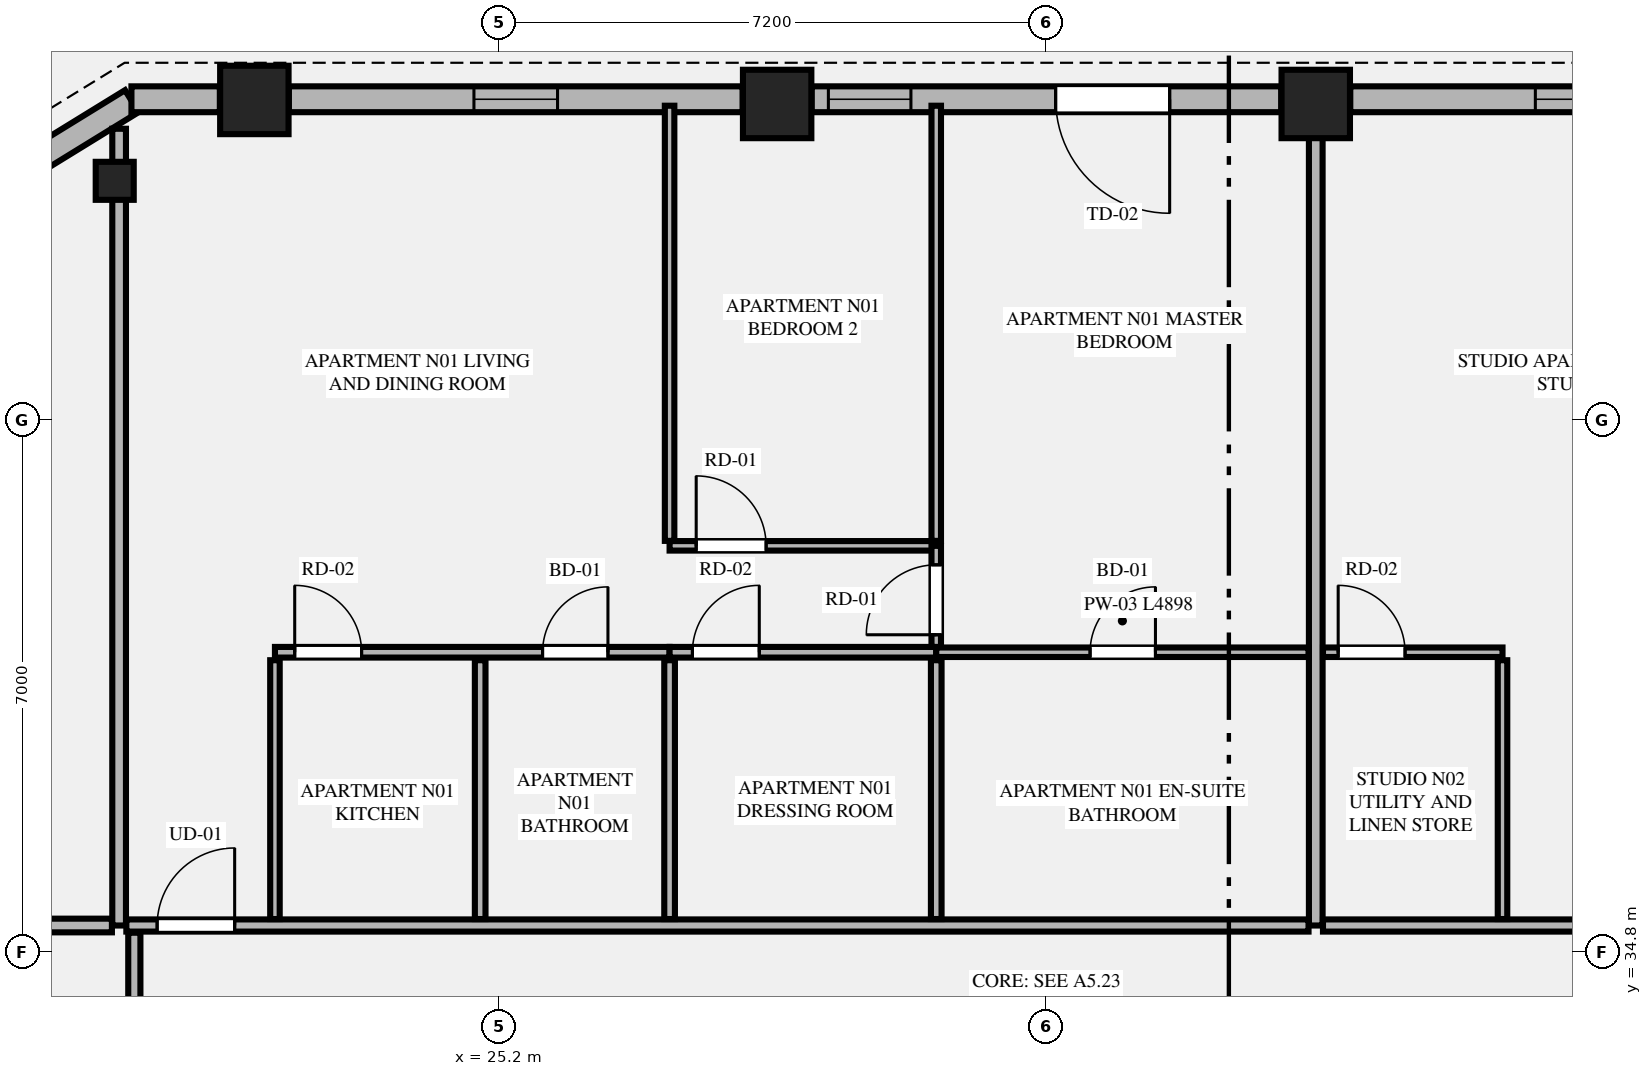
"""IFC4 building model, lengths in metres.
Left out: names, types, materials, properties, quantities, classifications, styles, units other than length and angle.
Written with IfcOpenShell. Run it as: python <this file> out.ifc"""

import sys

from ifc_helpers import new_model, si_unit, direction, frame, frame_2d, origin, origin_2d, place, context, subcontext, project, spatial, rectangle, extrude, element, fill, save


model = new_model("IFC4")
c1 = context("Model", 3, precision=1e-05, world=origin(), true_north=direction((0.0, 1.0)))
c2 = subcontext(c1, "Body", "Model", "MODEL_VIEW")
j1 = project(units=[si_unit("LENGTHUNIT", "METRE"), si_unit("PLANEANGLEUNIT", "RADIAN")], contexts=[c1])
p1 = place(None, origin())
s1 = spatial("IfcSite", under=j1, at=p1, CompositionType="ELEMENT")
p2 = place(p1, origin())
s2 = spatial("IfcBuilding", under=s1, at=p2, CompositionType="ELEMENT")
p3 = place(p2, frame((0.0, 0.0, 171.9)))
s3 = spatial("IfcBuildingStorey", under=s2, at=p3, CompositionType="ELEMENT", Elevation=171.9)
for number, where, z_axis, x_axis in (
    (1, (35.943, 45.958, 0.0), (0.0, 0.0, 1.0), (1.0, 0.0, 0.0)),
    (2, (28.857, 45.958, 0.0), (0.0, 0.0, 1.0), (1.0, 0.0, 0.0)),
    (3, (21.979, 46.011, 0.0), (0.0, 0.0, 1.0), (1.0, 0.0, 0.0)),
):
    element("IfcColumn", number, at=place(p3, frame(where, z_axis=z_axis, x_axis=x_axis)), inside=s3, PredefinedType="COLUMN", context=c2, shape_type="SweptSolid", body=[
        extrude(rectangle(XDim=0.9, YDim=0.9, at=origin_2d()), origin(), (0.0, 0.0, 1.0), 3.55),
    ])
p4 = place(p3, frame((20.142, 44.947, 0.0), z_axis=(0.0, 0.0, 1.0), x_axis=(-0.865230187018, -0.501374833306, 0.0)))
e4 = element("IfcColumn", 4, at=p4, inside=s3, PredefinedType="PILASTER", context=c2, shape_type="SweptSolid", body=[
    extrude(rectangle(XDim=0.5, YDim=0.35, at=origin_2d()), origin(), (0.0, 0.0, 1.0), 3.55),
])
p5 = place(p3, frame((20.367, 45.995, 0.0), z_axis=(0.0, 0.0, 1.0), x_axis=(-0.851713271379, -0.524008113828, 0.0)))
e5 = element("IfcWall", 5, at=p5, inside=s3, PredefinedType="STANDARD", context=c2, shape_type="SweptSolid", body=[
    extrude(rectangle(XDim=1.678, YDim=0.34, at=frame_2d((0.839, 0.0))), origin(), (0.0, 0.0, 1.0), 3.35),
])
p6 = place(p3, frame((42.367, 46.02, 0.0), z_axis=(0.0, 0.0, 1.0), x_axis=(-1.0, 0.0, 0.0)))
e6 = element("IfcWall", 6, at=p6, inside=s3, PredefinedType="STANDARD", context=c2, shape_type="SweptSolid", body=[
    extrude(rectangle(XDim=5.97, YDim=0.34, at=frame_2d((2.985, 0.0))), origin(), (0.0, 0.0, 1.0), 2.883),
])
p7 = place(p6, frame((2.435, 0.0, 0.75)))
e7 = element("IfcOpeningElement", 7, at=p7, cuts=e6, PredefinedType="OPENING", context=c2, shape_type="SweptSolid", body=[
    extrude(rectangle(XDim=1.1, YDim=1.983, at=frame_2d((0.55, 0.991))), frame((0.0, 0.18, 0.0), z_axis=(0.0, -1.0, 0.0), x_axis=(1.0, 0.0, 0.0)), (0.0, 0.0, 1.0), 0.36),
])
p8 = place(p3, frame((35.489, 46.02, 0.0), z_axis=(0.0, 0.0, 1.0), x_axis=(-1.0, 0.0, 0.0)))
e8 = element("IfcWall", 8, at=p8, inside=s3, PredefinedType="STANDARD", context=c2, shape_type="SweptSolid", body=[
    extrude(rectangle(XDim=6.178, YDim=0.34, at=frame_2d((3.089, 0.0))), origin(), (0.0, 0.0, 1.0), 2.883),
])
p9 = place(p8, frame((1.468, 0.0, 0.0)))
e9 = element("IfcOpeningElement", 9, at=p9, cuts=e8, PredefinedType="OPENING", context=c2, shape_type="SweptSolid", body=[
    extrude(rectangle(XDim=1.5, YDim=2.3, at=frame_2d((0.75, 1.15))), frame((0.0, 0.18, 0.0), z_axis=(0.0, -1.0, 0.0), x_axis=(1.0, 0.0, 0.0)), (0.0, 0.0, 1.0), 0.36),
])
p10 = place(p8, frame((4.872, 0.0, 0.75)))
e10 = element("IfcOpeningElement", 10, at=p10, cuts=e8, PredefinedType="OPENING", context=c2, shape_type="SweptSolid", body=[
    extrude(rectangle(XDim=1.086, YDim=1.983, at=frame_2d((0.543, 0.991))), frame((0.0, 0.18, 0.0), z_axis=(0.0, -1.0, 0.0), x_axis=(1.0, 0.0, 0.0)), (0.0, 0.0, 1.0), 0.36),
])
p11 = place(p3, frame((28.403, 46.02, 0.0), z_axis=(0.0, 0.0, 1.0), x_axis=(-1.0, 0.0, 0.0)))
e11 = element("IfcWall", 11, at=p11, inside=s3, PredefinedType="STANDARD", context=c2, shape_type="SweptSolid", body=[
    extrude(rectangle(XDim=5.97, YDim=0.34, at=frame_2d((2.985, 0.0))), origin(), (0.0, 0.0, 1.0), 2.883),
])
p12 = place(p11, frame((2.435, 0.0, 0.75)))
e12 = element("IfcOpeningElement", 12, at=p12, cuts=e11, PredefinedType="OPENING", context=c2, shape_type="SweptSolid", body=[
    extrude(rectangle(XDim=1.1, YDim=1.983, at=frame_2d((0.55, 0.991))), frame((0.0, 0.18, 0.0), z_axis=(0.0, -1.0, 0.0), x_axis=(1.0, 0.0, 0.0)), (0.0, 0.0, 1.0), 0.36),
])
p13 = place(p3, frame((21.525, 46.02, 0.0), z_axis=(0.0, 0.0, 1.0), x_axis=(-1.0, 0.0, 0.0)))
e13 = element("IfcWall", 13, at=p13, inside=s3, PredefinedType="STANDARD", context=c2, shape_type="SweptSolid", body=[
    extrude(rectangle(XDim=1.163, YDim=0.34, at=frame_2d((0.582, 0.0))), origin(), (0.0, 0.0, 1.0), 3.35),
])
p14 = place(p3, frame((20.2, 35.15, 0.0), z_axis=(0.0, 0.0, 1.0), x_axis=(0.0, 1.0, 0.0)))
e14 = element("IfcWall", 14, at=p14, inside=s3, PredefinedType="PARTITIONING", context=c2, shape_type="SweptSolid", body=[
    extrude(rectangle(XDim=10.482, YDim=0.18, at=frame_2d((5.241, 0.0))), origin(), (0.0, 0.0, 1.0), 3.35),
])
p15 = place(p3, frame((35.943, 35.15, 0.0), z_axis=(0.0, 0.0, 1.0), x_axis=(0.0, 1.0, 0.0)))
e15 = element("IfcWall", 15, at=p15, inside=s3, PredefinedType="PARTITIONING", context=c2, shape_type="SweptSolid", body=[
    extrude(rectangle(XDim=10.695, YDim=0.18, at=frame_2d((5.348, 0.0))), origin(), (0.0, 0.0, 1.0), 2.807),
])
p16 = place(p3, frame((20.295, 35.15, 0.0), z_axis=(0.0, 0.0, 1.0), x_axis=(1.0, 0.0, 0.0)))
e16 = element("IfcWall", 16, at=p16, inside=s3, PredefinedType="PARTITIONING", context=c2, shape_type="SweptSolid", body=[
    extrude(rectangle(XDim=15.553, YDim=0.16, at=frame_2d((7.776, 0.0))), origin(), (0.0, 0.0, 1.0), 3.35),
])
p17 = place(p16, frame((0.405, 0.0, 0.0)))
e17 = element("IfcOpeningElement", 17, at=p17, cuts=e16, PredefinedType="OPENING", context=c2, shape_type="SweptSolid", body=[
    extrude(rectangle(XDim=1.02, YDim=2.25, at=frame_2d((0.51, 1.125))), frame((0.0, 0.09, 0.0), z_axis=(0.0, -1.0, 0.0), x_axis=(1.0, 0.0, 0.0)), (0.0, 0.0, 1.0), 0.18),
])
p18 = place(p3, frame((22.25, 35.235, 0.0), z_axis=(0.0, 0.0, 1.0), x_axis=(0.0, 1.0, 0.0)))
e18 = element("IfcWall", 18, at=p18, inside=s3, PredefinedType="PARTITIONING", context=c2, shape_type="SweptSolid", body=[
    extrude(rectangle(XDim=3.405, YDim=0.125, at=frame_2d((1.702, 0.0))), origin(), (0.0, 0.0, 1.0), 2.807),
])
p19 = place(p3, frame((22.25, 38.745, 0.0), z_axis=(0.0, 0.0, 1.0), x_axis=(1.0, 0.0, 0.0)))
e19 = element("IfcWall", 19, at=p19, inside=s3, PredefinedType="PLUMBINGWALL", context=c2, shape_type="SweptSolid", body=[
    extrude(rectangle(XDim=5.192, YDim=0.14, at=frame_2d((2.596, 0.0))), origin(), (0.0, 0.0, 1.0), 3.35),
])
p20 = place(p19, frame((3.521, 0.0, 0.0)))
e20 = element("IfcOpeningElement", 20, at=p20, cuts=e19, PredefinedType="OPENING", context=c2, shape_type="SweptSolid", body=[
    extrude(rectangle(XDim=0.86, YDim=2.1, at=frame_2d((0.43, 1.05))), frame((0.0, 0.08, 0.0), z_axis=(0.0, -1.0, 0.0), x_axis=(1.0, 0.0, 0.0)), (0.0, 0.0, 1.0), 0.16),
])
p21 = place(p19, frame((0.26, 0.0, 0.0)))
e21 = element("IfcOpeningElement", 21, at=p21, cuts=e19, PredefinedType="OPENING", context=c2, shape_type="SweptSolid", body=[
    extrude(rectangle(XDim=0.88, YDim=2.15, at=frame_2d((0.44, 1.075))), frame((0.0, 0.08, 0.0), z_axis=(0.0, -1.0, 0.0), x_axis=(1.0, 0.0, 0.0)), (0.0, 0.0, 1.0), 0.16),
])
p22 = place(p3, frame((27.442, 38.745, 0.0), z_axis=(0.0, 0.0, 1.0), x_axis=(1.0, 0.0, 0.0)))
e22 = element("IfcWall", 22, at=p22, inside=s3, PredefinedType="PLUMBINGWALL", context=c2, shape_type="SweptSolid", body=[
    extrude(rectangle(XDim=3.508, YDim=0.14, at=frame_2d((1.754, 0.0))), origin(), (0.0, 0.0, 1.0), 3.35),
])
p23 = place(p22, frame((0.3, 0.0, 0.0)))
e23 = element("IfcOpeningElement", 23, at=p23, cuts=e22, PredefinedType="OPENING", context=c2, shape_type="SweptSolid", body=[
    extrude(rectangle(XDim=0.88, YDim=2.15, at=frame_2d((0.44, 1.075))), frame((0.0, 0.08, 0.0), z_axis=(0.0, -1.0, 0.0), x_axis=(1.0, 0.0, 0.0)), (0.0, 0.0, 1.0), 0.16),
])
p24 = place(p3, frame((30.95, 38.745, 0.0), z_axis=(0.0, 0.0, 1.0), x_axis=(1.0, 0.0, 0.0)))
e24 = element("IfcWall", 24, at=p24, inside=s3, PredefinedType="PARTITIONING", context=c2, shape_type="SweptSolid", body=[
    extrude(rectangle(XDim=4.898, YDim=0.125, at=frame_2d((2.449, 0.0))), origin(), (0.0, 0.0, 1.0), 3.35),
])
p25 = place(p24, frame((2.024, 0.0, 0.0)))
e25 = element("IfcOpeningElement", 25, at=p25, cuts=e24, PredefinedType="OPENING", context=c2, shape_type="SweptSolid", body=[
    extrude(rectangle(XDim=0.86, YDim=2.1, at=frame_2d((0.43, 1.05))), frame((0.0, 0.073, 0.0), z_axis=(0.0, -1.0, 0.0), x_axis=(1.0, 0.0, 0.0)), (0.0, 0.0, 1.0), 0.145),
])
p26 = place(p3, frame((24.95, 35.235, 0.0), z_axis=(0.0, 0.0, 1.0), x_axis=(0.0, 1.0, 0.0)))
e26 = element("IfcWall", 26, at=p26, inside=s3, PredefinedType="PLUMBINGWALL", context=c2, shape_type="SweptSolid", body=[
    extrude(rectangle(XDim=3.405, YDim=0.14, at=frame_2d((1.702, 0.0))), origin(), (0.0, 0.0, 1.0), 3.35),
])
p27 = place(p3, frame((27.442, 40.21, 0.0), z_axis=(0.0, 0.0, 1.0), x_axis=(0.0, 1.0, 0.0)))
e27 = element("IfcWall", 27, at=p27, inside=s3, PredefinedType="PARTITIONING", context=c2, shape_type="SweptSolid", body=[
    extrude(rectangle(XDim=5.725, YDim=0.125, at=frame_2d((2.863, 0.0))), origin(), (0.0, 0.0, 1.0), 3.35),
])
p28 = place(p3, frame((27.442, 40.145, 0.0), z_axis=(0.0, 0.0, 1.0), x_axis=(1.0, 0.0, 0.0)))
e28 = element("IfcWall", 28, at=p28, inside=s3, PredefinedType="PARTITIONING", context=c2, shape_type="SweptSolid", body=[
    extrude(rectangle(XDim=3.508, YDim=0.125, at=frame_2d((1.754, 0.0))), origin(), (0.0, 0.0, 1.0), 3.35),
])
p29 = place(p28, frame((0.35, 0.0, 0.0)))
e29 = element("IfcOpeningElement", 29, at=p29, cuts=e28, PredefinedType="OPENING", context=c2, shape_type="SweptSolid", body=[
    extrude(rectangle(XDim=0.92, YDim=2.15, at=frame_2d((0.46, 1.075))), frame((0.0, 0.073, 0.0), z_axis=(0.0, -1.0, 0.0), x_axis=(1.0, 0.0, 0.0)), (0.0, 0.0, 1.0), 0.145),
])
p30 = place(p3, frame((30.95, 38.815, 0.0), z_axis=(0.0, 0.0, 1.0), x_axis=(0.0, 1.0, 0.0)))
e30 = element("IfcWall", 30, at=p30, inside=s3, PredefinedType="PARTITIONING", context=c2, shape_type="SweptSolid", body=[
    extrude(rectangle(XDim=1.33, YDim=0.125, at=frame_2d((0.665, 0.0))), origin(), (0.0, 0.0, 1.0), 3.35),
])
p31 = place(p30, frame((0.16, 0.0, 0.0)))
e31 = element("IfcOpeningElement", 31, at=p31, cuts=e30, PredefinedType="OPENING", context=c2, shape_type="SweptSolid", body=[
    extrude(rectangle(XDim=0.92, YDim=2.15, at=frame_2d((0.46, 1.075))), frame((0.0, 0.073, 0.0), z_axis=(0.0, -1.0, 0.0), x_axis=(1.0, 0.0, 0.0)), (0.0, 0.0, 1.0), 0.145),
])
for number, where, z_axis, x_axis in (
    (32, (27.442, 35.235, 0.0), (0.0, 0.0, 1.0), (0.0, 1.0, 0.0)),
    (33, (30.95, 35.235, 0.0), (0.0, 0.0, 1.0), (0.0, 1.0, 0.0)),
):
    element("IfcWall", number, at=place(p3, frame(where, z_axis=z_axis, x_axis=x_axis)), inside=s3, PredefinedType="PLUMBINGWALL", context=c2, shape_type="SweptSolid", body=[
        extrude(rectangle(XDim=3.405, YDim=0.14, at=frame_2d((1.702, 0.0))), origin(), (0.0, 0.0, 1.0), 3.35),
    ])
p32 = place(p3, frame((30.95, 40.21, 0.0), z_axis=(0.0, 0.0, 1.0), x_axis=(0.0, 1.0, 0.0)))
e34 = element("IfcWall", 34, at=p32, inside=s3, PredefinedType="PARTITIONING", context=c2, shape_type="SweptSolid", body=[
    extrude(rectangle(XDim=5.725, YDim=0.125, at=frame_2d((2.863, 0.0))), origin(), (0.0, 0.0, 1.0), 3.35),
])
p33 = place(p3, frame((36.038, 35.15, 0.0), z_axis=(0.0, 0.0, 1.0), x_axis=(1.0, 0.0, 0.0)))
e35 = element("IfcWall", 35, at=p33, inside=s3, PredefinedType="PARTITIONING", context=c2, shape_type="SweptSolid", body=[
    extrude(rectangle(XDim=8.467, YDim=0.16, at=frame_2d((4.233, 0.0))), origin(), (0.0, 0.0, 1.0), 3.35),
])
p34 = place(p33, frame((6.212, 0.0, 0.0)))
e36 = element("IfcOpeningElement", 36, at=p34, cuts=e35, PredefinedType="OPENING", context=c2, shape_type="SweptSolid", body=[
    extrude(rectangle(XDim=1.02, YDim=2.25, at=frame_2d((0.51, 1.125))), frame((0.0, 0.09, 0.0), z_axis=(0.0, -1.0, 0.0), x_axis=(1.0, 0.0, 0.0)), (0.0, 0.0, 1.0), 0.18),
])
p35 = place(p3, frame((38.4, 35.235, 0.0), z_axis=(0.0, 0.0, 1.0), x_axis=(0.0, 1.0, 0.0)))
e37 = element("IfcWall", 37, at=p35, inside=s3, PredefinedType="PARTITIONING", context=c2, shape_type="SweptSolid", body=[
    extrude(rectangle(XDim=3.405, YDim=0.125, at=frame_2d((1.702, 0.0))), origin(), (0.0, 0.0, 1.0), 3.35),
])
p36 = place(p3, frame((36.038, 38.745, 0.0), z_axis=(0.0, 0.0, 1.0), x_axis=(1.0, 0.0, 0.0)))
e38 = element("IfcWall", 38, at=p36, inside=s3, PredefinedType="PARTITIONING", context=c2, shape_type="SweptSolid", body=[
    extrude(rectangle(XDim=2.362, YDim=0.125, at=frame_2d((1.181, 0.0))), origin(), (0.0, 0.0, 1.0), 3.35),
])
p37 = place(p36, frame((0.2, 0.0, 0.0)))
e39 = element("IfcOpeningElement", 39, at=p37, cuts=e38, PredefinedType="OPENING", context=c2, shape_type="SweptSolid", body=[
    extrude(rectangle(XDim=0.88, YDim=2.15, at=frame_2d((0.44, 1.075))), frame((0.0, 0.073, 0.0), z_axis=(0.0, -1.0, 0.0), x_axis=(1.0, 0.0, 0.0)), (0.0, 0.0, 1.0), 0.145),
])
p38 = place(p3, frame((14.11, 35.15, 0.0), z_axis=(0.0, 0.0, 1.0), x_axis=(1.0, 0.0, 0.0)))
e40 = element("IfcWall", 40, at=p38, inside=s3, PredefinedType="PARTITIONING", context=c2, shape_type="SweptSolid", body=[
    extrude(rectangle(XDim=5.995, YDim=0.18, at=frame_2d((2.998, 0.0))), origin(), (0.0, 0.0, 1.0), 3.35),
])
p39 = place(p3, frame((20.4, 25.795, 0.0), z_axis=(0.0, 0.0, 1.0), x_axis=(0.0, 1.0, 0.0)))
e41 = element("IfcWall", 41, at=p39, inside=s3, PredefinedType="PARTITIONING", context=c2, shape_type="SweptSolid", body=[
    extrude(rectangle(XDim=9.26, YDim=0.16, at=frame_2d((4.63, 0.0))), origin(), (0.0, 0.0, 1.0), 3.35),
])
p40 = place(p39, frame((0.45, 0.0, 0.0)))
e42 = element("IfcOpeningElement", 42, at=p40, cuts=e41, PredefinedType="OPENING", context=c2, shape_type="SweptSolid", body=[
    extrude(rectangle(XDim=1.02, YDim=2.25, at=frame_2d((0.51, 1.125))), frame((0.0, 0.09, 0.0), z_axis=(0.0, -1.0, 0.0), x_axis=(1.0, 0.0, 0.0)), (0.0, 0.0, 1.0), 0.18),
])
p41 = place(p7, origin())
e43 = element("IfcWindow", 43, at=p41, inside=s3, PartitioningType="SINGLE_PANEL", PredefinedType="WINDOW", context=c2, shape_type="SweptSolid", body=[
    extrude(rectangle(XDim=1.1, YDim=1.983, at=frame_2d((0.55, 0.991))), frame((0.0, 0.03, 0.0), z_axis=(0.0, -1.0, 0.0), x_axis=(1.0, 0.0, 0.0)), (0.0, 0.0, 1.0), 0.06),
])
fill(e7, e43)
p42 = place(p9, origin())
e44 = element("IfcDoor", 44, at=p42, inside=s3, OperationType="SINGLE_SWING_LEFT", PredefinedType="DOOR", context=c2, shape_type="SweptSolid", body=[
    extrude(rectangle(XDim=1.5, YDim=2.3, at=frame_2d((0.75, 1.15))), frame((0.0, 0.025, 0.0), z_axis=(0.0, -1.0, 0.0), x_axis=(1.0, 0.0, 0.0)), (0.0, 0.0, 1.0), 0.05),
])
fill(e9, e44)
p43 = place(p12, origin())
e45 = element("IfcWindow", 45, at=p43, inside=s3, PartitioningType="SINGLE_PANEL", PredefinedType="WINDOW", context=c2, shape_type="SweptSolid", body=[
    extrude(rectangle(XDim=1.1, YDim=1.983, at=frame_2d((0.55, 0.991))), frame((0.0, 0.03, 0.0), z_axis=(0.0, -1.0, 0.0), x_axis=(1.0, 0.0, 0.0)), (0.0, 0.0, 1.0), 0.06),
])
fill(e12, e45)
p44 = place(p20, origin())
e46 = element("IfcDoor", 46, at=p44, inside=s3, OperationType="SINGLE_SWING_RIGHT", PredefinedType="DOOR", context=c2, shape_type="SweptSolid", body=[
    extrude(rectangle(XDim=0.86, YDim=2.1, at=frame_2d((0.43, 1.05))), frame((0.0, 0.025, 0.0), z_axis=(0.0, -1.0, 0.0), x_axis=(1.0, 0.0, 0.0)), (0.0, 0.0, 1.0), 0.05),
])
fill(e20, e46)
p45 = place(p25, origin())
e47 = element("IfcDoor", 47, at=p45, inside=s3, OperationType="SINGLE_SWING_RIGHT", PredefinedType="DOOR", context=c2, shape_type="SweptSolid", body=[
    extrude(rectangle(XDim=0.86, YDim=2.1, at=frame_2d((0.43, 1.05))), frame((0.0, 0.025, 0.0), z_axis=(0.0, -1.0, 0.0), x_axis=(1.0, 0.0, 0.0)), (0.0, 0.0, 1.0), 0.05),
])
fill(e25, e47)
p46 = place(p17, origin())
e48 = element("IfcDoor", 48, at=p46, inside=s3, OperationType="SINGLE_SWING_RIGHT", PredefinedType="DOOR", context=c2, shape_type="SweptSolid", body=[
    extrude(rectangle(XDim=1.02, YDim=2.25, at=frame_2d((0.51, 1.125))), frame((0.0, 0.025, 0.0), z_axis=(0.0, -1.0, 0.0), x_axis=(1.0, 0.0, 0.0)), (0.0, 0.0, 1.0), 0.05),
])
fill(e17, e48)
p47 = place(p21, origin())
e49 = element("IfcDoor", 49, at=p47, inside=s3, OperationType="SINGLE_SWING_LEFT", PredefinedType="DOOR", context=c2, shape_type="SweptSolid", body=[
    extrude(rectangle(XDim=0.88, YDim=2.15, at=frame_2d((0.44, 1.075))), frame((0.0, 0.025, 0.0), z_axis=(0.0, -1.0, 0.0), x_axis=(1.0, 0.0, 0.0)), (0.0, 0.0, 1.0), 0.05),
])
fill(e21, e49)
p48 = place(p23, origin())
e50 = element("IfcDoor", 50, at=p48, inside=s3, OperationType="SINGLE_SWING_RIGHT", PredefinedType="DOOR", context=c2, shape_type="SweptSolid", body=[
    extrude(rectangle(XDim=0.88, YDim=2.15, at=frame_2d((0.44, 1.075))), frame((0.0, 0.025, 0.0), z_axis=(0.0, -1.0, 0.0), x_axis=(1.0, 0.0, 0.0)), (0.0, 0.0, 1.0), 0.05),
])
fill(e23, e50)
p49 = place(p29, origin())
e51 = element("IfcDoor", 51, at=p49, inside=s3, OperationType="SINGLE_SWING_LEFT", PredefinedType="DOOR", context=c2, shape_type="SweptSolid", body=[
    extrude(rectangle(XDim=0.92, YDim=2.15, at=frame_2d((0.46, 1.075))), frame((0.0, 0.025, 0.0), z_axis=(0.0, -1.0, 0.0), x_axis=(1.0, 0.0, 0.0)), (0.0, 0.0, 1.0), 0.05),
])
fill(e29, e51)
p50 = place(p31, origin())
e52 = element("IfcDoor", 52, at=p50, inside=s3, OperationType="SINGLE_SWING_LEFT", PredefinedType="DOOR", context=c2, shape_type="SweptSolid", body=[
    extrude(rectangle(XDim=0.92, YDim=2.15, at=frame_2d((0.46, 1.075))), frame((0.0, 0.025, 0.0), z_axis=(0.0, -1.0, 0.0), x_axis=(1.0, 0.0, 0.0)), (0.0, 0.0, 1.0), 0.05),
])
fill(e31, e52)
p51 = place(p37, origin())
e53 = element("IfcDoor", 53, at=p51, inside=s3, OperationType="SINGLE_SWING_LEFT", PredefinedType="DOOR", context=c2, shape_type="SweptSolid", body=[
    extrude(rectangle(XDim=0.88, YDim=2.15, at=frame_2d((0.44, 1.075))), frame((0.0, 0.025, 0.0), z_axis=(0.0, -1.0, 0.0), x_axis=(1.0, 0.0, 0.0)), (0.0, 0.0, 1.0), 0.05),
])
fill(e39, e53)
p52 = place(p10, origin())
e54 = element("IfcWindow", 54, at=p52, inside=s3, PartitioningType="SINGLE_PANEL", PredefinedType="WINDOW", context=c2, shape_type="SweptSolid", body=[
    extrude(rectangle(XDim=1.086, YDim=1.983, at=frame_2d((0.543, 0.991))), frame((0.0, 0.03, 0.0), z_axis=(0.0, -1.0, 0.0), x_axis=(1.0, 0.0, 0.0)), (0.0, 0.0, 1.0), 0.06),
])
fill(e10, e54)
save(model, sys.argv[1])
